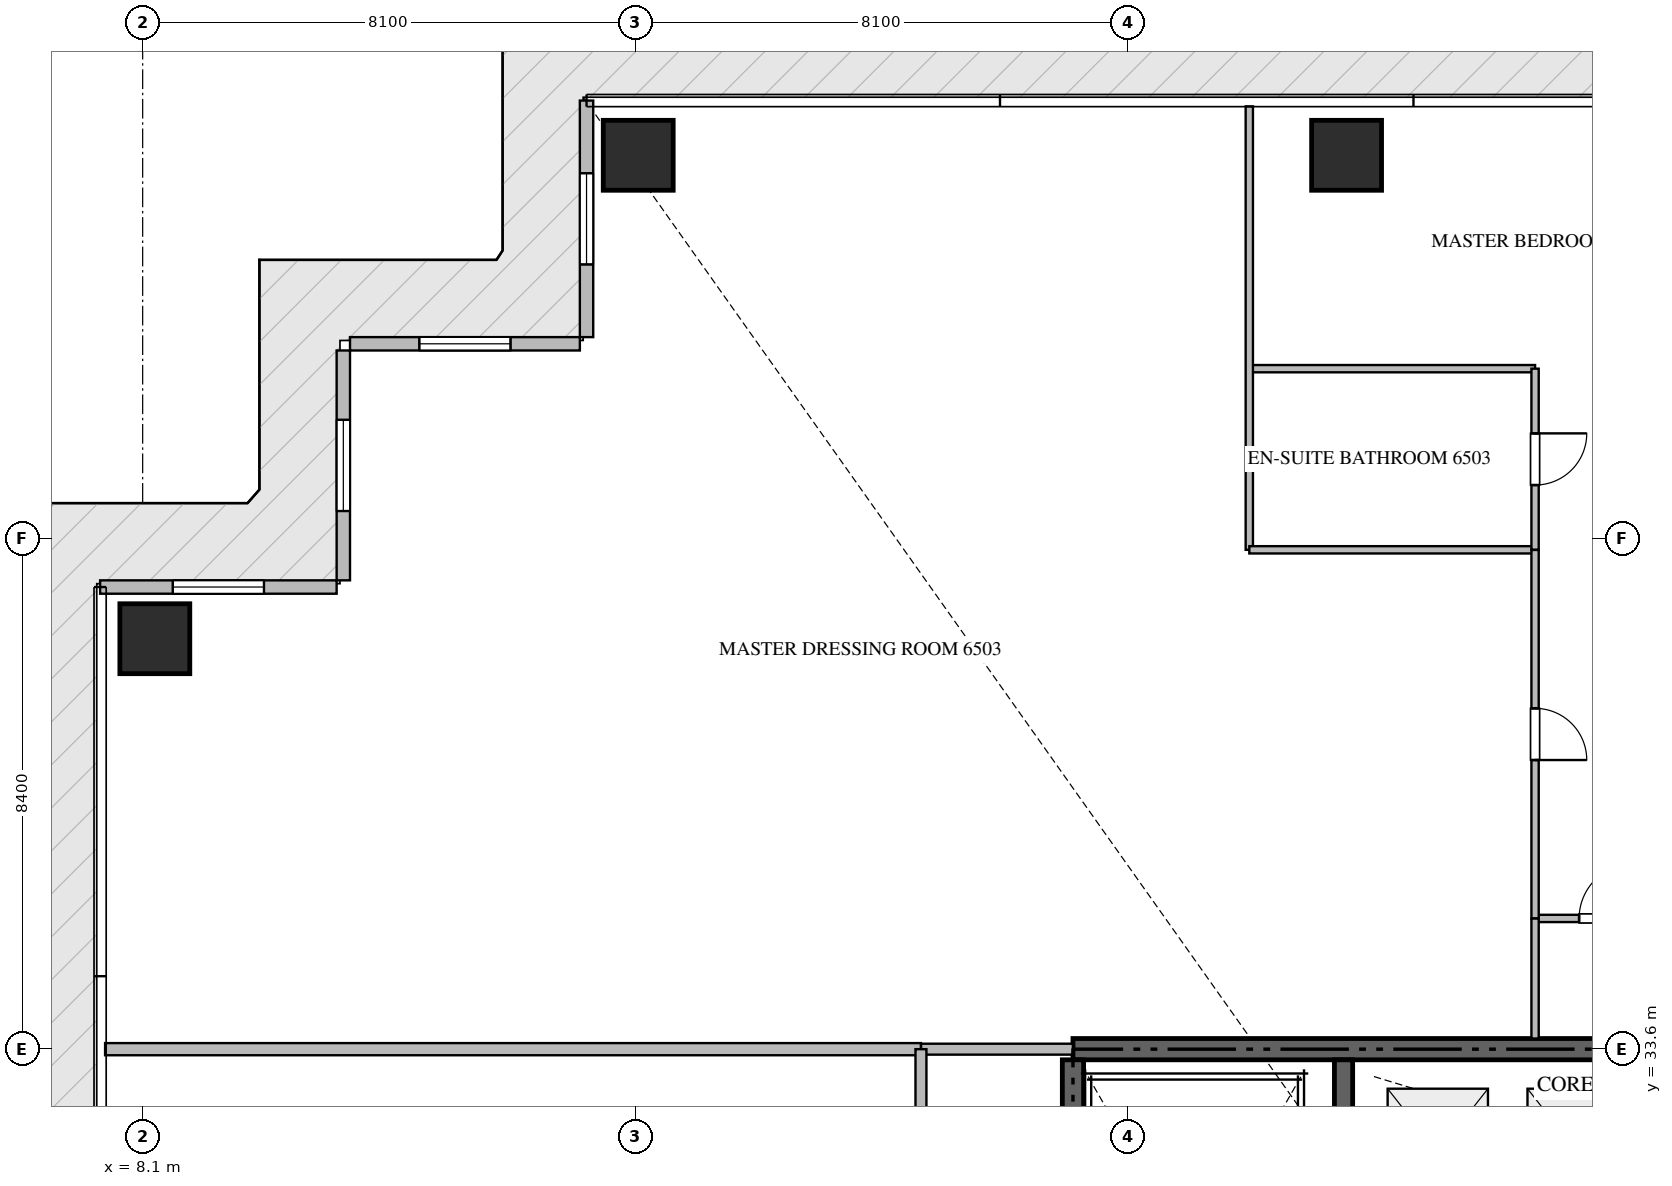
"""IFC4 building model, lengths in metres.
Left out: names, types, materials, properties, quantities, classifications, styles, units other than length and angle.
Written with IfcOpenShell. Run it as: python <this file> out.ifc"""

import sys

from ifc_helpers import new_model, si_unit, direction, frame, frame_2d, origin, origin_2d, place, context, subcontext, project, spatial, rectangle, extrude, source, transform, mapped, element, fill, save


model = new_model("IFC4")
c1 = context("Model", 3, precision=1e-05, world=origin(), true_north=direction((0.0, 1.0)))
c2 = subcontext(c1, "Body", "Model", "MODEL_VIEW")
j1 = project(units=[si_unit("LENGTHUNIT", "METRE"), si_unit("PLANEANGLEUNIT", "RADIAN")], contexts=[c1])
p1 = place(None, origin())
s1 = spatial("IfcSite", under=j1, at=p1, CompositionType="ELEMENT")
p2 = place(p1, origin())
s2 = spatial("IfcBuilding", under=s1, at=p2, CompositionType="ELEMENT")
p3 = place(p2, frame((0.0, 0.0, 260.5)))
s3 = spatial("IfcBuildingStorey", under=s2, at=p3, CompositionType="ELEMENT", Elevation=260.5)
p4 = place(p3, frame((41.4, 33.6, -0.26), z_axis=(0.0, 0.0, 1.0), x_axis=(-1.0, 0.0, 0.0)))
e1 = element("IfcWall", 1, at=p4, inside=s3, PredefinedType="SHEAR", context=c2, shape_type="SweptSolid", body=[
    extrude(rectangle(XDim=18.0, YDim=0.35, at=frame_2d((9.0, 0.0))), origin(), (0.0, 0.0, 1.0), 3.848),
])
p5 = place(p3, frame((23.4, 24.25, -0.26), z_axis=(0.0, 0.0, 1.0), x_axis=(0.0, 1.0, 0.0)))
e2 = element("IfcWall", 2, at=p5, inside=s3, PredefinedType="SHEAR", context=c2, shape_type="SweptSolid", body=[
    extrude(rectangle(XDim=9.175, YDim=0.35, at=frame_2d((4.587, 0.0))), origin(), (0.0, 0.0, 1.0), 3.848),
])
p6 = place(p3, frame((27.85, 23.55, -0.26), z_axis=(0.0, 0.0, 1.0), x_axis=(0.0, 1.0, 0.0)))
e3 = element("IfcWall", 3, at=p6, inside=s3, PredefinedType="SHEAR", context=c2, shape_type="SweptSolid", body=[
    extrude(rectangle(XDim=9.875, YDim=0.3, at=frame_2d((4.938, 0.0))), origin(), (0.0, 0.0, 1.0), 3.848),
])
m1 = source(origin(), c2, "Body", "SweptSolid", [
    extrude(rectangle(XDim=1.15, YDim=1.15, at=origin_2d()), origin(), (0.0, 0.0, 1.0), 3.85),
])
for number, where, z_axis, x_axis in (
    (4, (16.25, 48.3, -0.26), (0.0, 0.0, 1.0), (1.0, 0.0, 0.0)),
    (5, (27.9, 48.3, -0.26), (0.0, 0.0, 1.0), (1.0, 0.0, 0.0)),
    (6, (8.3, 40.35, -0.26), (0.0, 0.0, 1.0), (1.0, 0.0, 0.0)),
):
    element("IfcColumn", number, at=place(p3, frame(where, z_axis=z_axis, x_axis=x_axis)), inside=s3, PredefinedType="COLUMN", context=c2, shape_type="MappedRepresentation", body=[
        mapped(m1, transform((0.0, 0.0, 0.0), scale=1.0)),
    ])
p7 = place(p3, frame((15.4, 49.2, 0.0), z_axis=(0.0, 0.0, 1.0), x_axis=(0.0, -1.0, 0.0)))
e7 = element("IfcWall", 7, at=p7, inside=s3, PredefinedType="ELEMENTEDWALL", context=c2, shape_type="SweptSolid", body=[
    extrude(rectangle(XDim=3.89, YDim=0.22, at=frame_2d((1.945, 0.0))), origin(), (0.0, 0.0, 1.0), 3.575),
])
p8 = place(p7, frame((1.195, 0.0, 0.65)))
e8 = element("IfcOpeningElement", 8, at=p8, cuts=e7, PredefinedType="OPENING", context=c2, shape_type="SweptSolid", body=[
    extrude(rectangle(XDim=1.5, YDim=2.25, at=frame_2d((0.75, 1.125))), frame((0.0, 0.12, 0.0), z_axis=(0.0, -1.0, 0.0), x_axis=(1.0, 0.0, 0.0)), (0.0, 0.0, 1.0), 0.24),
])
p9 = place(p3, frame((15.29, 45.2, 0.0), z_axis=(0.0, 0.0, 1.0), x_axis=(-1.0, 0.0, 0.0)))
e9 = element("IfcWall", 9, at=p9, inside=s3, PredefinedType="ELEMENTEDWALL", context=c2, shape_type="SweptSolid", body=[
    extrude(rectangle(XDim=3.78, YDim=0.22, at=frame_2d((1.89, 0.0))), origin(), (0.0, 0.0, 1.0), 3.575),
])
p10 = place(p9, frame((1.14, 0.0, 0.65)))
e10 = element("IfcOpeningElement", 10, at=p10, cuts=e9, PredefinedType="OPENING", context=c2, shape_type="SweptSolid", body=[
    extrude(rectangle(XDim=1.5, YDim=2.25, at=frame_2d((0.75, 1.125))), frame((0.0, 0.12, 0.0), z_axis=(0.0, -1.0, 0.0), x_axis=(1.0, 0.0, 0.0)), (0.0, 0.0, 1.0), 0.24),
])
p11 = place(p3, frame((11.4, 45.09, 0.0), z_axis=(0.0, 0.0, 1.0), x_axis=(0.0, -1.0, 0.0)))
e11 = element("IfcWall", 11, at=p11, inside=s3, PredefinedType="ELEMENTEDWALL", context=c2, shape_type="SweptSolid", body=[
    extrude(rectangle(XDim=3.78, YDim=0.22, at=frame_2d((1.89, 0.0))), origin(), (0.0, 0.0, 1.0), 3.575),
])
p12 = place(p11, frame((1.14, 0.0, 0.65)))
e12 = element("IfcOpeningElement", 12, at=p12, cuts=e11, PredefinedType="OPENING", context=c2, shape_type="SweptSolid", body=[
    extrude(rectangle(XDim=1.5, YDim=2.25, at=frame_2d((0.75, 1.125))), frame((0.0, 0.12, 0.0), z_axis=(0.0, -1.0, 0.0), x_axis=(1.0, 0.0, 0.0)), (0.0, 0.0, 1.0), 0.24),
])
p13 = place(p3, frame((11.29, 41.2, 0.0), z_axis=(0.0, 0.0, 1.0), x_axis=(-1.0, 0.0, 0.0)))
e13 = element("IfcWall", 13, at=p13, inside=s3, PredefinedType="ELEMENTEDWALL", context=c2, shape_type="SweptSolid", body=[
    extrude(rectangle(XDim=3.89, YDim=0.22, at=frame_2d((1.945, 0.0))), origin(), (0.0, 0.0, 1.0), 3.575),
])
p14 = place(p13, frame((1.195, 0.0, 0.65)))
e14 = element("IfcOpeningElement", 14, at=p14, cuts=e13, PredefinedType="OPENING", context=c2, shape_type="SweptSolid", body=[
    extrude(rectangle(XDim=1.5, YDim=2.25, at=frame_2d((0.75, 1.125))), frame((0.0, 0.12, 0.0), z_axis=(0.0, -1.0, 0.0), x_axis=(1.0, 0.0, 0.0)), (0.0, 0.0, 1.0), 0.24),
])
p15 = place(p3, frame((7.482, 33.6, 0.0), z_axis=(0.0, 0.0, 1.0), x_axis=(1.0, 0.0, 0.0)))
e15 = element("IfcWall", 15, at=p15, inside=s3, PredefinedType="PARTITIONING", context=c2, shape_type="SweptSolid", body=[
    extrude(rectangle(XDim=13.418, YDim=0.2, at=frame_2d((6.709, 0.0))), origin(), (0.0, 0.0, 1.0), 3.59),
])
p16 = place(p3, frame((20.902, 33.6, 0.0), z_axis=(0.0, 0.0, 1.0), x_axis=(1.0, 0.0, 0.0)))
e16 = element("IfcWall", 16, at=p16, inside=s3, PredefinedType="PARTITIONING", context=c2, shape_type="SweptSolid", body=[
    extrude(rectangle(XDim=2.496, YDim=0.18, at=frame_2d((1.248, 0.0))), origin(), (0.0, 0.0, 1.0), 3.59),
])
p17 = place(p3, frame((20.9, 16.8, 0.0), z_axis=(0.0, 0.0, 1.0), x_axis=(0.0, 1.0, 0.0)))
e17 = element("IfcWall", 17, at=p17, inside=s3, PredefinedType="PARTITIONING", context=c2, shape_type="SweptSolid", body=[
    extrude(rectangle(XDim=16.8, YDim=0.18, at=frame_2d((8.4, 0.0))), origin(), (0.0, 0.0, 1.0), 3.59),
])
p18 = place(p17, frame((4.803, 0.0, 0.0)))
e18 = element("IfcOpeningElement", 18, at=p18, cuts=e17, PredefinedType="OPENING", context=c2, shape_type="SweptSolid", body=[
    extrude(rectangle(XDim=1.0, YDim=2.15, at=frame_2d((0.5, 1.075))), frame((0.0, 0.1, 0.0), z_axis=(0.0, -1.0, 0.0), x_axis=(1.0, 0.0, 0.0)), (0.0, 0.0, 1.0), 0.2),
])
p19 = place(p17, frame((13.225, 0.0, 0.0)))
e19 = element("IfcOpeningElement", 19, at=p19, cuts=e17, PredefinedType="OPENING", context=c2, shape_type="SweptSolid", body=[
    extrude(rectangle(XDim=1.0, YDim=2.15, at=frame_2d((0.5, 1.075))), frame((0.0, 0.1, 0.0), z_axis=(0.0, -1.0, 0.0), x_axis=(1.0, 0.0, 0.0)), (0.0, 0.0, 1.0), 0.2),
])
p20 = place(p3, frame((31.0, 35.75, 0.0), z_axis=(0.0, 0.0, 1.0), x_axis=(1.0, 0.0, 0.0)))
e20 = element("IfcWall", 20, at=p20, inside=s3, PredefinedType="PARTITIONING", context=c2, shape_type="SweptSolid", body=[
    extrude(rectangle(XDim=2.348, YDim=0.12, at=frame_2d((1.174, 0.0))), origin(), (0.0, 0.0, 1.0), 3.59),
])
p21 = place(p20, frame((0.724, 0.0, 0.0)))
e21 = element("IfcOpeningElement", 21, at=p21, cuts=e20, PredefinedType="OPENING", context=c2, shape_type="SweptSolid", body=[
    extrude(rectangle(XDim=0.9, YDim=2.1, at=frame_2d((0.45, 1.05))), frame((0.0, 0.07, 0.0), z_axis=(0.0, -1.0, 0.0), x_axis=(1.0, 0.0, 0.0)), (0.0, 0.0, 1.0), 0.14),
])
p22 = place(p3, frame((26.3, 44.791, 0.0), z_axis=(0.0, 0.0, 1.0), x_axis=(1.0, 0.0, 0.0)))
e22 = element("IfcWall", 22, at=p22, inside=s3, PredefinedType="PARTITIONING", context=c2, shape_type="SweptSolid", body=[
    extrude(rectangle(XDim=4.7, YDim=0.12, at=frame_2d((2.35, 0.0))), origin(), (0.0, 0.0, 1.0), 3.59),
])
p23 = place(p3, frame((26.3, 49.105, 0.0), z_axis=(0.0, 0.0, 1.0), x_axis=(0.0, -1.0, 0.0)))
e23 = element("IfcWall", 23, at=p23, inside=s3, PredefinedType="PARTITIONING", context=c2, shape_type="SweptSolid", body=[
    extrude(rectangle(XDim=7.293, YDim=0.12, at=frame_2d((3.646, 0.0))), origin(), (0.0, 0.0, 1.0), 3.59),
])
p24 = place(p3, frame((26.3, 41.812, 0.0), z_axis=(0.0, 0.0, 1.0), x_axis=(1.0, 0.0, 0.0)))
e24 = element("IfcWall", 24, at=p24, inside=s3, PredefinedType="PARTITIONING", context=c2, shape_type="SweptSolid", body=[
    extrude(rectangle(XDim=4.7, YDim=0.12, at=frame_2d((2.35, 0.0))), origin(), (0.0, 0.0, 1.0), 3.59),
])
p25 = place(p3, frame((31.0, 44.791, 0.0), z_axis=(0.0, 0.0, 1.0), x_axis=(0.0, -1.0, 0.0)))
e25 = element("IfcWall", 25, at=p25, inside=s3, PredefinedType="PARTITIONING", context=c2, shape_type="SweptSolid", body=[
    extrude(rectangle(XDim=2.979, YDim=0.12, at=frame_2d((1.49, 0.0))), origin(), (0.0, 0.0, 1.0), 3.59),
])
p26 = place(p25, frame((1.064, 0.0, 0.0)))
e26 = element("IfcOpeningElement", 26, at=p26, cuts=e25, PredefinedType="OPENING", context=c2, shape_type="SweptSolid", body=[
    extrude(rectangle(XDim=0.85, YDim=2.1, at=frame_2d((0.425, 1.05))), frame((0.0, 0.07, 0.0), z_axis=(0.0, -1.0, 0.0), x_axis=(1.0, 0.0, 0.0)), (0.0, 0.0, 1.0), 0.14),
])
p27 = place(p3, frame((31.0, 41.81, 0.0), z_axis=(0.0, 0.0, 1.0), x_axis=(0.0, -1.0, 0.0)))
e27 = element("IfcWall", 27, at=p27, inside=s3, PredefinedType="PARTITIONING", context=c2, shape_type="SweptSolid", body=[
    extrude(rectangle(XDim=6.06, YDim=0.12, at=frame_2d((3.03, 0.0))), origin(), (0.0, 0.0, 1.0), 3.59),
])
p28 = place(p27, frame((2.605, 0.0, 0.0)))
e28 = element("IfcOpeningElement", 28, at=p28, cuts=e27, PredefinedType="OPENING", context=c2, shape_type="SweptSolid", body=[
    extrude(rectangle(XDim=0.85, YDim=2.1, at=frame_2d((0.425, 1.05))), frame((0.0, 0.07, 0.0), z_axis=(0.0, -1.0, 0.0), x_axis=(1.0, 0.0, 0.0)), (0.0, 0.0, 1.0), 0.14),
])
p29 = place(p3, frame((31.0, 35.748, 0.0), z_axis=(0.0, 0.0, 1.0), x_axis=(0.0, -1.0, 0.0)))
e29 = element("IfcWall", 29, at=p29, inside=s3, PredefinedType="PARTITIONING", context=c2, shape_type="SweptSolid", body=[
    extrude(rectangle(XDim=1.973, YDim=0.12, at=frame_2d((0.987, 0.0))), origin(), (0.0, 0.0, 1.0), 3.59),
])
m2 = source(origin(), c2, "Body", "SweptSolid", [
    extrude(rectangle(XDim=1.5, YDim=2.25, at=frame_2d((0.75, 1.125))), frame((0.0, 0.03, 0.0), z_axis=(0.0, -1.0, 0.0), x_axis=(1.0, 0.0, 0.0)), (0.0, 0.0, 1.0), 0.06),
])
p30 = place(p8, origin())
e30 = element("IfcWindow", 30, at=p30, inside=s3, PartitioningType="SINGLE_PANEL", PredefinedType="WINDOW", context=c2, shape_type="MappedRepresentation", body=[
    mapped(m2, transform((0.0, 0.0, 0.0), scale=1.0)),
])
fill(e8, e30)
p31 = place(p10, origin())
e31 = element("IfcWindow", 31, at=p31, inside=s3, PartitioningType="SINGLE_PANEL", PredefinedType="WINDOW", context=c2, shape_type="MappedRepresentation", body=[
    mapped(m2, transform((0.0, 0.0, 0.0), scale=1.0)),
])
fill(e10, e31)
p32 = place(p12, origin())
e32 = element("IfcWindow", 32, at=p32, inside=s3, PartitioningType="SINGLE_PANEL", PredefinedType="WINDOW", context=c2, shape_type="MappedRepresentation", body=[
    mapped(m2, transform((0.0, 0.0, 0.0), scale=1.0)),
])
fill(e12, e32)
p33 = place(p14, origin())
e33 = element("IfcWindow", 33, at=p33, inside=s3, PartitioningType="SINGLE_PANEL", PredefinedType="WINDOW", context=c2, shape_type="MappedRepresentation", body=[
    mapped(m2, transform((0.0, 0.0, 0.0), scale=1.0)),
])
fill(e14, e33)
m3 = source(origin(), c2, "Body", "SweptSolid", [
    extrude(rectangle(XDim=0.9, YDim=2.1, at=frame_2d((0.45, 1.05))), frame((0.0, 0.025, 0.0), z_axis=(0.0, -1.0, 0.0), x_axis=(1.0, 0.0, 0.0)), (0.0, 0.0, 1.0), 0.05),
])
p34 = place(p21, origin())
e34 = element("IfcDoor", 34, at=p34, inside=s3, OperationType="SINGLE_SWING_RIGHT", PredefinedType="DOOR", context=c2, shape_type="MappedRepresentation", body=[
    mapped(m3, transform((0.0, 0.0, 0.0), scale=1.0)),
])
fill(e21, e34)
m4 = source(origin(), c2, "Body", "SweptSolid", [
    extrude(rectangle(XDim=0.85, YDim=2.1, at=frame_2d((0.425, 1.05))), frame((0.0, 0.025, 0.0), z_axis=(0.0, -1.0, 0.0), x_axis=(1.0, 0.0, 0.0)), (0.0, 0.0, 1.0), 0.05),
])
p35 = place(p26, origin())
e35 = element("IfcDoor", 35, at=p35, inside=s3, OperationType="SINGLE_SWING_LEFT", PredefinedType="DOOR", context=c2, shape_type="MappedRepresentation", body=[
    mapped(m4, transform((0.0, 0.0, 0.0), scale=1.0)),
])
fill(e26, e35)
p36 = place(p28, origin())
e36 = element("IfcDoor", 36, at=p36, inside=s3, OperationType="SINGLE_SWING_RIGHT", PredefinedType="DOOR", context=c2, shape_type="MappedRepresentation", body=[
    mapped(m4, transform((0.0, 0.0, 0.0), scale=1.0)),
])
fill(e28, e36)
save(model, sys.argv[1])
